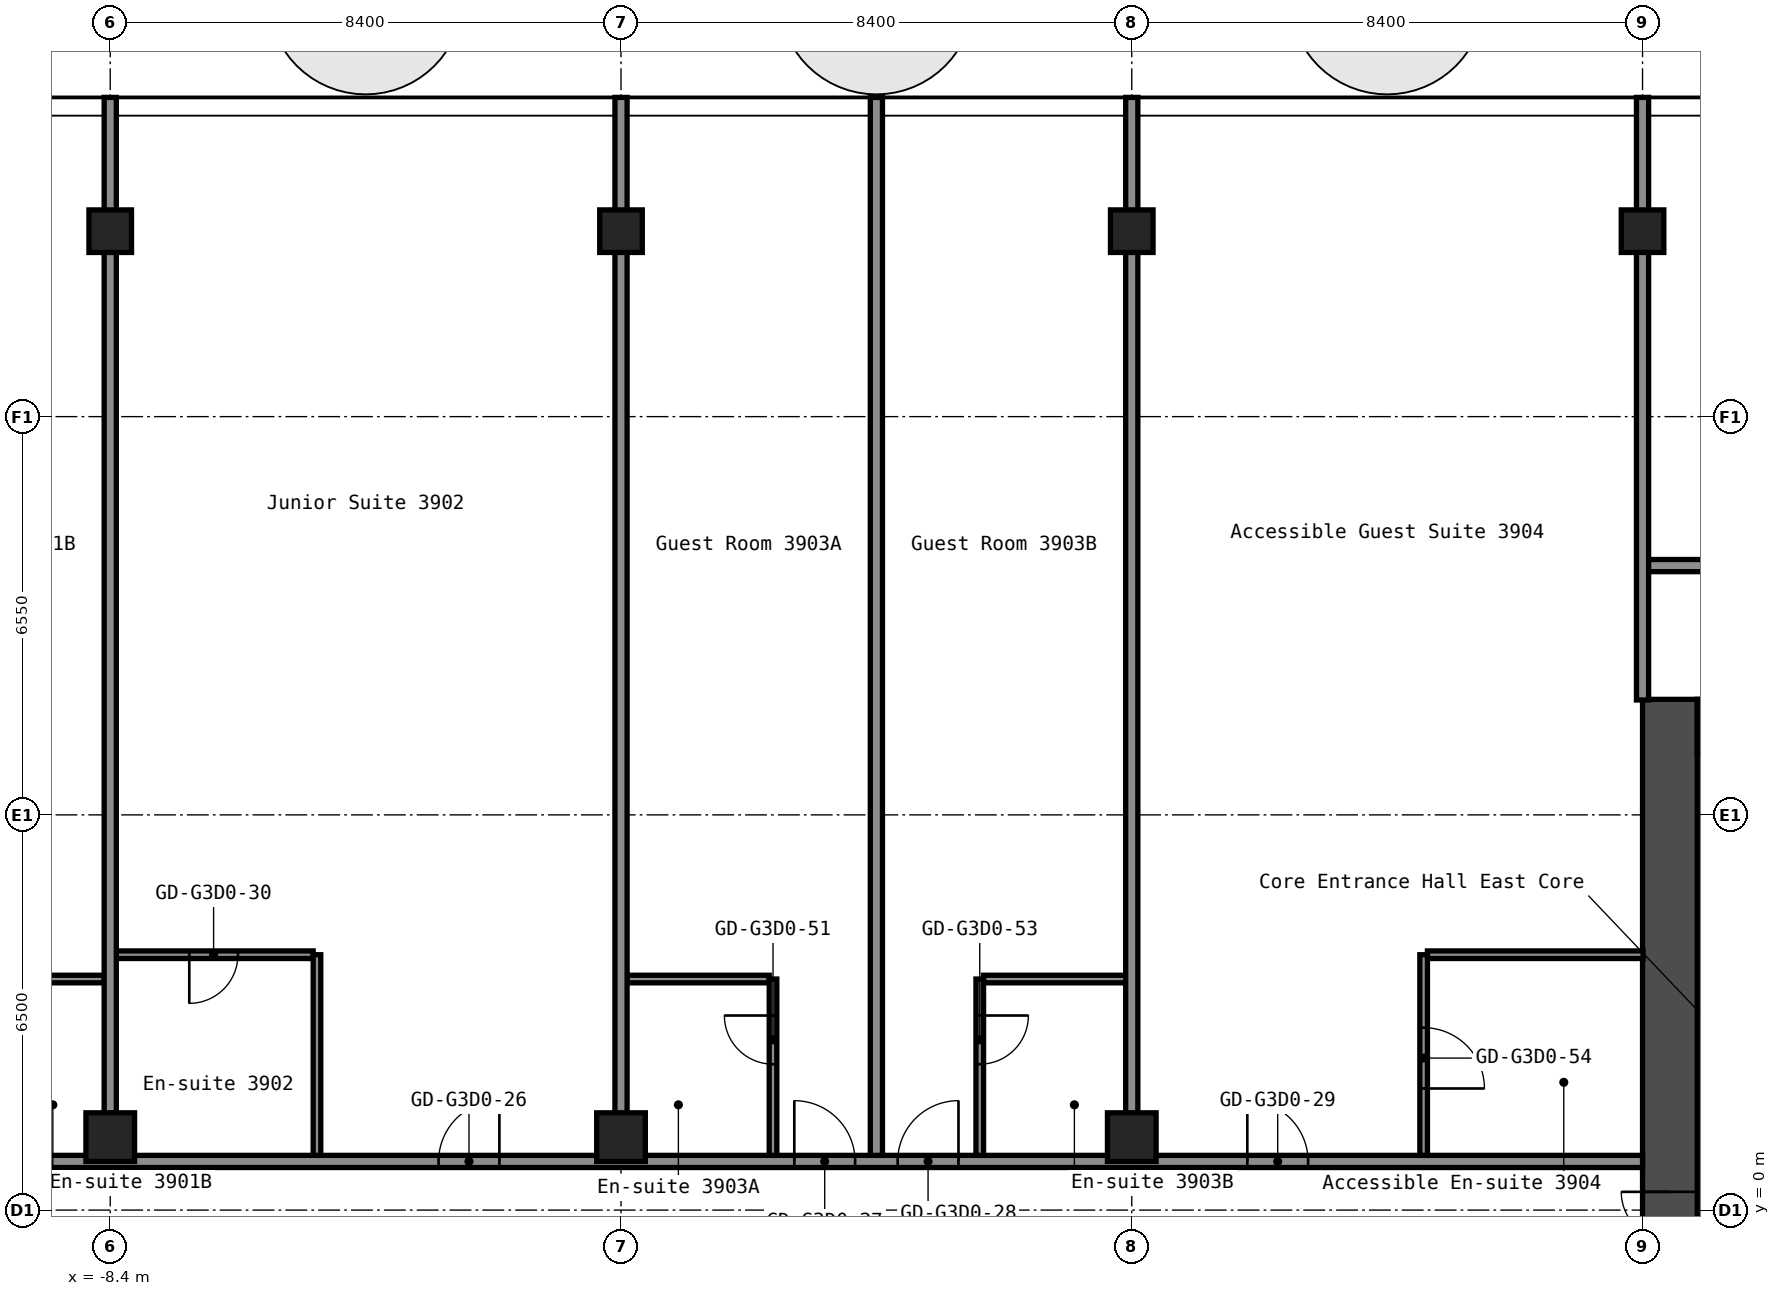
"""IFC4 building model, lengths in metres.
Left out: names, types, materials, properties, quantities, classifications, styles, units other than length and angle.
Written with IfcOpenShell. Run it as: python <this file> out.ifc"""

import sys

from ifc_helpers import new_model, si_unit, direction, frame, frame_2d, origin, origin_2d, place, context, subcontext, project, spatial, rectangle, hollow_rectangle, extrude, element, fill, save


model = new_model("IFC4")
c1 = context("Model", 3, precision=1e-05, world=origin(), true_north=direction((0.0, 1.0)))
c2 = subcontext(c1, "Body", "Model", "MODEL_VIEW")
j1 = project(units=[si_unit("LENGTHUNIT", "METRE"), si_unit("PLANEANGLEUNIT", "RADIAN")], contexts=[c1])
p1 = place(None, origin())
s1 = spatial("IfcSite", under=j1, at=p1, CompositionType="ELEMENT")
p2 = place(p1, origin())
s2 = spatial("IfcBuilding", under=s1, at=p2, CompositionType="ELEMENT")
p3 = place(p2, frame((0.0, 0.0, 140.6)))
s3 = spatial("IfcBuildingStorey", under=s2, at=p3, CompositionType="ELEMENT", Elevation=140.6)
p4 = place(p3, frame((-8.4, 1.2, 0.0), z_axis=(0.0, 0.0, 1.0), x_axis=(1.0, 0.0, 0.0)))
e1 = element("IfcColumn", 1, at=p4, inside=s3, PredefinedType="COLUMN", context=c2, shape_type="SweptSolid", body=[
    extrude(hollow_rectangle(XDim=0.8, YDim=0.8, WallThickness=0.032, at=origin_2d()), origin(), (0.0, 0.0, 1.0), 2.75),
])
p5 = place(p3, frame((-8.4, 16.1, 0.0), z_axis=(0.0, 0.0, 1.0), x_axis=(1.0, 0.0, 0.0)))
e2 = element("IfcColumn", 2, at=p5, inside=s3, PredefinedType="COLUMN", context=c2, shape_type="SweptSolid", body=[
    extrude(hollow_rectangle(XDim=0.7, YDim=0.7, WallThickness=0.028, at=origin_2d()), origin(), (0.0, 0.0, 1.0), 2.75),
])
p6 = place(p3, frame((0.0, 1.2, 0.0), z_axis=(0.0, 0.0, 1.0), x_axis=(1.0, 0.0, 0.0)))
e3 = element("IfcColumn", 3, at=p6, inside=s3, PredefinedType="COLUMN", context=c2, shape_type="SweptSolid", body=[
    extrude(hollow_rectangle(XDim=0.8, YDim=0.8, WallThickness=0.032, at=origin_2d()), origin(), (0.0, 0.0, 1.0), 2.75),
])
p7 = place(p3, frame((0.0, 16.1, 0.0), z_axis=(0.0, 0.0, 1.0), x_axis=(1.0, 0.0, 0.0)))
e4 = element("IfcColumn", 4, at=p7, inside=s3, PredefinedType="COLUMN", context=c2, shape_type="SweptSolid", body=[
    extrude(hollow_rectangle(XDim=0.7, YDim=0.7, WallThickness=0.028, at=origin_2d()), origin(), (0.0, 0.0, 1.0), 2.75),
])
p8 = place(p3, frame((8.4, 1.2, 0.0), z_axis=(0.0, 0.0, 1.0), x_axis=(1.0, 0.0, 0.0)))
e5 = element("IfcColumn", 5, at=p8, inside=s3, PredefinedType="COLUMN", context=c2, shape_type="SweptSolid", body=[
    extrude(hollow_rectangle(XDim=0.8, YDim=0.8, WallThickness=0.032, at=origin_2d()), origin(), (0.0, 0.0, 1.0), 2.75),
])
for number, where, z_axis, x_axis in (
    (6, (8.4, 16.1, 0.0), (0.0, 0.0, 1.0), (1.0, 0.0, 0.0)),
    (7, (16.8, 16.1, 0.0), (0.0, 0.0, 1.0), (1.0, 0.0, 0.0)),
):
    element("IfcColumn", number, at=place(p3, frame(where, z_axis=z_axis, x_axis=x_axis)), inside=s3, PredefinedType="COLUMN", context=c2, shape_type="SweptSolid", body=[
        extrude(hollow_rectangle(XDim=0.7, YDim=0.7, WallThickness=0.028, at=origin_2d()), origin(), (0.0, 0.0, 1.0), 2.75),
    ])
p9 = place(p3, frame((17.25, -8.4, 0.0), z_axis=(0.0, 0.0, 1.0), x_axis=(0.0, 1.0, 0.0)))
e8 = element("IfcWall", 8, at=p9, inside=s3, PredefinedType="SHEAR", context=c2, shape_type="SweptSolid", body=[
    extrude(rectangle(XDim=16.8, YDim=0.9, at=frame_2d((8.4, 0.0))), origin(), (0.0, 0.0, 1.0), 2.75),
])
p10 = place(p9, frame((7.1, 0.0, 0.0)))
e9 = element("IfcOpeningElement", 9, at=p10, cuts=e8, PredefinedType="OPENING", context=c2, shape_type="SweptSolid", body=[
    extrude(rectangle(XDim=1.6, YDim=2.1, at=frame_2d((0.8, 1.05))), frame((0.0, 0.46, 0.0), z_axis=(0.0, -1.0, 0.0), x_axis=(1.0, 0.0, 0.0)), (0.0, 0.0, 1.0), 0.92),
])
p11 = place(p3, frame((17.7, 7.95, 0.0), z_axis=(0.0, 0.0, 1.0), x_axis=(1.0, 0.0, 0.0)))
e10 = element("IfcWall", 10, at=p11, inside=s3, PredefinedType="SHEAR", context=c2, shape_type="SweptSolid", body=[
    extrude(rectangle(XDim=15.0, YDim=0.9, at=frame_2d((7.5, 0.0))), origin(), (0.0, 0.0, 1.0), 2.75),
])
p12 = place(p11, frame((10.4, 0.0, 0.0)))
e11 = element("IfcOpeningElement", 11, at=p12, cuts=e10, PredefinedType="OPENING", context=c2, shape_type="SweptSolid", body=[
    extrude(rectangle(XDim=1.2, YDim=2.1, at=frame_2d((0.6, 1.05))), frame((0.0, 0.46, 0.0), z_axis=(0.0, -1.0, 0.0), x_axis=(1.0, 0.0, 0.0)), (0.0, 0.0, 1.0), 0.92),
])
p13 = place(p11, frame((13.35, 0.0, 0.0)))
e12 = element("IfcOpeningElement", 12, at=p13, cuts=e10, PredefinedType="OPENING", context=c2, shape_type="SweptSolid", body=[
    extrude(rectangle(XDim=0.9, YDim=2.1, at=frame_2d((0.45, 1.05))), frame((0.0, 0.46, 0.0), z_axis=(0.0, -1.0, 0.0), x_axis=(1.0, 0.0, 0.0)), (0.0, 0.0, 1.0), 0.92),
])
p14 = place(p3, frame((-16.8, 0.8, 0.0), z_axis=(0.0, 0.0, 1.0), x_axis=(1.0, 0.0, 0.0)))
e13 = element("IfcWall", 13, at=p14, inside=s3, PredefinedType="PARTITIONING", context=c2, shape_type="SweptSolid", body=[
    extrude(rectangle(XDim=33.6, YDim=0.2, at=frame_2d((16.8, 0.0))), origin(), (0.0, 0.0, 1.0), 2.75),
])
p15 = place(p14, frame((2.85, 0.0, 0.0)))
e14 = element("IfcOpeningElement", 14, at=p15, cuts=e13, PredefinedType="OPENING", context=c2, shape_type="SweptSolid", body=[
    extrude(rectangle(XDim=1.0, YDim=2.1, at=frame_2d((0.5, 1.05))), frame((0.0, 0.11, 0.0), z_axis=(0.0, -1.0, 0.0), x_axis=(1.0, 0.0, 0.0)), (0.0, 0.0, 1.0), 0.22),
])
p16 = place(p14, frame((4.55, 0.0, 0.0)))
e15 = element("IfcOpeningElement", 15, at=p16, cuts=e13, PredefinedType="OPENING", context=c2, shape_type="SweptSolid", body=[
    extrude(rectangle(XDim=1.0, YDim=2.1, at=frame_2d((0.5, 1.05))), frame((0.0, 0.11, 0.0), z_axis=(0.0, -1.0, 0.0), x_axis=(1.0, 0.0, 0.0)), (0.0, 0.0, 1.0), 0.22),
])
p17 = place(p14, frame((13.8, 0.0, 0.0)))
e16 = element("IfcOpeningElement", 16, at=p17, cuts=e13, PredefinedType="OPENING", context=c2, shape_type="SweptSolid", body=[
    extrude(rectangle(XDim=1.0, YDim=2.1, at=frame_2d((0.5, 1.05))), frame((0.0, 0.11, 0.0), z_axis=(0.0, -1.0, 0.0), x_axis=(1.0, 0.0, 0.0)), (0.0, 0.0, 1.0), 0.22),
])
p18 = place(p14, frame((19.65, 0.0, 0.0)))
e17 = element("IfcOpeningElement", 17, at=p18, cuts=e13, PredefinedType="OPENING", context=c2, shape_type="SweptSolid", body=[
    extrude(rectangle(XDim=1.0, YDim=2.1, at=frame_2d((0.5, 1.05))), frame((0.0, 0.11, 0.0), z_axis=(0.0, -1.0, 0.0), x_axis=(1.0, 0.0, 0.0)), (0.0, 0.0, 1.0), 0.22),
])
p19 = place(p14, frame((21.35, 0.0, 0.0)))
e18 = element("IfcOpeningElement", 18, at=p19, cuts=e13, PredefinedType="OPENING", context=c2, shape_type="SweptSolid", body=[
    extrude(rectangle(XDim=1.0, YDim=2.1, at=frame_2d((0.5, 1.05))), frame((0.0, 0.11, 0.0), z_axis=(0.0, -1.0, 0.0), x_axis=(1.0, 0.0, 0.0)), (0.0, 0.0, 1.0), 0.22),
])
p20 = place(p14, frame((27.1, 0.0, 0.0)))
e19 = element("IfcOpeningElement", 19, at=p20, cuts=e13, PredefinedType="OPENING", context=c2, shape_type="SweptSolid", body=[
    extrude(rectangle(XDim=1.0, YDim=2.1, at=frame_2d((0.5, 1.05))), frame((0.0, 0.11, 0.0), z_axis=(0.0, -1.0, 0.0), x_axis=(1.0, 0.0, 0.0)), (0.0, 0.0, 1.0), 0.22),
])
for number, where, z_axis, x_axis in (
    (20, (-10.837, 3.8, 0.0), (0.0, 0.0, 1.0), (1.0, 0.0, 0.0)),
    (21, (0.1, 3.8, 0.0), (0.0, 0.0, 1.0), (1.0, 0.0, 0.0)),
):
    element("IfcWall", number, at=place(p3, frame(where, z_axis=z_axis, x_axis=x_axis)), inside=s3, PredefinedType="PARTITIONING", context=c2, shape_type="SweptSolid", body=[
        extrude(rectangle(XDim=2.337, YDim=0.125, at=frame_2d((1.169, 0.0))), origin(), (0.0, 0.0, 1.0), 2.75),
    ])
p21 = place(p3, frame((5.962, 3.8, 0.0), z_axis=(0.0, 0.0, 1.0), x_axis=(1.0, 0.0, 0.0)))
e22 = element("IfcWall", 22, at=p21, inside=s3, PredefinedType="PARTITIONING", context=c2, shape_type="SweptSolid", body=[
    extrude(rectangle(XDim=2.338, YDim=0.125, at=frame_2d((1.169, 0.0))), origin(), (0.0, 0.0, 1.0), 2.75),
])
p22 = place(p3, frame((-8.3, 4.2, 0.0), z_axis=(0.0, 0.0, 1.0), x_axis=(1.0, 0.0, 0.0)))
e23 = element("IfcWall", 23, at=p22, inside=s3, PredefinedType="PARTITIONING", context=c2, shape_type="SweptSolid", body=[
    extrude(rectangle(XDim=3.238, YDim=0.125, at=frame_2d((1.619, 0.0))), origin(), (0.0, 0.0, 1.0), 2.75),
])
p23 = place(p22, frame((1.2, 0.0, 0.0)))
e24 = element("IfcOpeningElement", 24, at=p23, cuts=e23, PredefinedType="OPENING", context=c2, shape_type="SweptSolid", body=[
    extrude(rectangle(XDim=0.8, YDim=2.1, at=frame_2d((0.4, 1.05))), frame((0.0, 0.073, 0.0), z_axis=(0.0, -1.0, 0.0), x_axis=(1.0, 0.0, 0.0)), (0.0, 0.0, 1.0), 0.145),
])
p24 = place(p3, frame((13.262, 4.2, 0.0), z_axis=(0.0, 0.0, 1.0), x_axis=(1.0, 0.0, 0.0)))
e25 = element("IfcWall", 25, at=p24, inside=s3, PredefinedType="PARTITIONING", context=c2, shape_type="SweptSolid", body=[
    extrude(rectangle(XDim=3.548, YDim=0.125, at=frame_2d((1.774, 0.0))), origin(), (0.0, 0.0, 1.0), 2.75),
])
p25 = place(p3, frame((16.8, 10.6, 0.0), z_axis=(0.0, 0.0, 1.0), x_axis=(1.0, 0.0, 0.0)))
e26 = element("IfcWall", 26, at=p25, inside=s3, PredefinedType="PARTITIONING", context=c2, shape_type="SweptSolid", body=[
    extrude(rectangle(XDim=25.9, YDim=0.2, at=frame_2d((12.95, 0.0))), origin(), (0.0, 0.0, 1.0), 2.75),
])
p26 = place(p25, frame((3.4, 0.0, 0.0)))
e27 = element("IfcOpeningElement", 27, at=p26, cuts=e26, PredefinedType="OPENING", context=c2, shape_type="SweptSolid", body=[
    extrude(rectangle(XDim=1.6, YDim=2.1, at=frame_2d((0.8, 1.05))), frame((0.0, 0.11, 0.0), z_axis=(0.0, -1.0, 0.0), x_axis=(1.0, 0.0, 0.0)), (0.0, 0.0, 1.0), 0.22),
])
p27 = place(p25, frame((11.8, 0.0, 0.0)))
e28 = element("IfcOpeningElement", 28, at=p27, cuts=e26, PredefinedType="OPENING", context=c2, shape_type="SweptSolid", body=[
    extrude(rectangle(XDim=1.6, YDim=2.1, at=frame_2d((0.8, 1.05))), frame((0.0, 0.11, 0.0), z_axis=(0.0, -1.0, 0.0), x_axis=(1.0, 0.0, 0.0)), (0.0, 0.0, 1.0), 0.22),
])
p28 = place(p25, frame((20.4, 0.0, 0.0)))
e29 = element("IfcOpeningElement", 29, at=p28, cuts=e26, PredefinedType="OPENING", context=c2, shape_type="SweptSolid", body=[
    extrude(rectangle(XDim=1.6, YDim=2.1, at=frame_2d((0.8, 1.05))), frame((0.0, 0.11, 0.0), z_axis=(0.0, -1.0, 0.0), x_axis=(1.0, 0.0, 0.0)), (0.0, 0.0, 1.0), 0.22),
])
p29 = place(p3, frame((-8.4, 1.59, 0.0), z_axis=(0.0, 0.0, 1.0), x_axis=(0.0, 1.0, 0.0)))
e30 = element("IfcWall", 30, at=p29, inside=s3, PredefinedType="PARTITIONING", context=c2, shape_type="SweptSolid", body=[
    extrude(rectangle(XDim=16.71, YDim=0.2, at=frame_2d((8.355, 0.0))), origin(), (0.0, 0.0, 1.0), 2.75),
])
p30 = place(p3, frame((-5.0, 0.9, 0.0), z_axis=(0.0, 0.0, 1.0), x_axis=(0.0, 1.0, 0.0)))
e31 = element("IfcWall", 31, at=p30, inside=s3, PredefinedType="PARTITIONING", context=c2, shape_type="SweptSolid", body=[
    extrude(rectangle(XDim=3.3, YDim=0.125, at=frame_2d((1.65, 0.0))), origin(), (0.0, 0.0, 1.0), 2.75),
])
p31 = place(p3, frame((0.0, 1.59, 0.0), z_axis=(0.0, 0.0, 1.0), x_axis=(0.0, 1.0, 0.0)))
e32 = element("IfcWall", 32, at=p31, inside=s3, PredefinedType="PARTITIONING", context=c2, shape_type="SweptSolid", body=[
    extrude(rectangle(XDim=16.71, YDim=0.2, at=frame_2d((8.355, 0.0))), origin(), (0.0, 0.0, 1.0), 2.75),
])
p32 = place(p3, frame((2.5, 0.9, 0.0), z_axis=(0.0, 0.0, 1.0), x_axis=(0.0, 1.0, 0.0)))
e33 = element("IfcWall", 33, at=p32, inside=s3, PredefinedType="PARTITIONING", context=c2, shape_type="SweptSolid", body=[
    extrude(rectangle(XDim=2.9, YDim=0.125, at=frame_2d((1.45, 0.0))), origin(), (0.0, 0.0, 1.0), 2.75),
])
p33 = place(p32, frame((1.5, 0.0, 0.0)))
e34 = element("IfcOpeningElement", 34, at=p33, cuts=e33, PredefinedType="OPENING", context=c2, shape_type="SweptSolid", body=[
    extrude(rectangle(XDim=0.8, YDim=2.1, at=frame_2d((0.4, 1.05))), frame((0.0, 0.073, 0.0), z_axis=(0.0, -1.0, 0.0), x_axis=(1.0, 0.0, 0.0)), (0.0, 0.0, 1.0), 0.145),
])
p34 = place(p3, frame((4.2, 0.9, 0.0), z_axis=(0.0, 0.0, 1.0), x_axis=(0.0, 1.0, 0.0)))
e35 = element("IfcWall", 35, at=p34, inside=s3, PredefinedType="PARTITIONING", context=c2, shape_type="SweptSolid", body=[
    extrude(rectangle(XDim=17.4, YDim=0.2, at=frame_2d((8.7, 0.0))), origin(), (0.0, 0.0, 1.0), 2.75),
])
p35 = place(p3, frame((5.9, 0.9, 0.0), z_axis=(0.0, 0.0, 1.0), x_axis=(0.0, 1.0, 0.0)))
e36 = element("IfcWall", 36, at=p35, inside=s3, PredefinedType="PARTITIONING", context=c2, shape_type="SweptSolid", body=[
    extrude(rectangle(XDim=2.9, YDim=0.125, at=frame_2d((1.45, 0.0))), origin(), (0.0, 0.0, 1.0), 2.75),
])
p36 = place(p35, frame((1.5, 0.0, 0.0)))
e37 = element("IfcOpeningElement", 37, at=p36, cuts=e36, PredefinedType="OPENING", context=c2, shape_type="SweptSolid", body=[
    extrude(rectangle(XDim=0.8, YDim=2.1, at=frame_2d((0.4, 1.05))), frame((0.0, 0.073, 0.0), z_axis=(0.0, -1.0, 0.0), x_axis=(1.0, 0.0, 0.0)), (0.0, 0.0, 1.0), 0.145),
])
p37 = place(p3, frame((8.4, 1.59, 0.0), z_axis=(0.0, 0.0, 1.0), x_axis=(0.0, 1.0, 0.0)))
e38 = element("IfcWall", 38, at=p37, inside=s3, PredefinedType="PARTITIONING", context=c2, shape_type="SweptSolid", body=[
    extrude(rectangle(XDim=16.71, YDim=0.2, at=frame_2d((8.355, 0.0))), origin(), (0.0, 0.0, 1.0), 2.75),
])
p38 = place(p3, frame((13.2, 0.9, 0.0), z_axis=(0.0, 0.0, 1.0), x_axis=(0.0, 1.0, 0.0)))
e39 = element("IfcWall", 39, at=p38, inside=s3, PredefinedType="PARTITIONING", context=c2, shape_type="SweptSolid", body=[
    extrude(rectangle(XDim=3.3, YDim=0.125, at=frame_2d((1.65, 0.0))), origin(), (0.0, 0.0, 1.0), 2.75),
])
p39 = place(p38, frame((1.1, 0.0, 0.0)))
e40 = element("IfcOpeningElement", 40, at=p39, cuts=e39, PredefinedType="OPENING", context=c2, shape_type="SweptSolid", body=[
    extrude(rectangle(XDim=1.0, YDim=2.1, at=frame_2d((0.5, 1.05))), frame((0.0, 0.073, 0.0), z_axis=(0.0, -1.0, 0.0), x_axis=(1.0, 0.0, 0.0)), (0.0, 0.0, 1.0), 0.145),
])
p40 = place(p3, frame((16.8, 8.39, 0.0), z_axis=(0.0, 0.0, 1.0), x_axis=(0.0, 1.0, 0.0)))
e41 = element("IfcWall", 41, at=p40, inside=s3, PredefinedType="PARTITIONING", context=c2, shape_type="SweptSolid", body=[
    extrude(rectangle(XDim=9.91, YDim=0.2, at=frame_2d((4.955, 0.0))), origin(), (0.0, 0.0, 1.0), 2.75),
])
p41 = place(p10, origin())
e42 = element("IfcDoor", 42, at=p41, inside=s3, OperationType="DOUBLE_DOOR_SINGLE_SWING", PredefinedType="DOOR", context=c2, shape_type="SweptSolid", body=[
    extrude(rectangle(XDim=1.6, YDim=2.1, at=frame_2d((0.8, 1.05))), frame((0.0, 0.025, 0.0), z_axis=(0.0, -1.0, 0.0), x_axis=(1.0, 0.0, 0.0)), (0.0, 0.0, 1.0), 0.05),
])
fill(e9, e42)
p42 = place(p17, origin())
e43 = element("IfcDoor", 43, at=p42, inside=s3, OperationType="SINGLE_SWING_LEFT", PredefinedType="DOOR", context=c2, shape_type="SweptSolid", body=[
    extrude(rectangle(XDim=1.0, YDim=2.1, at=frame_2d((0.5, 1.05))), frame((0.0, 0.025, 0.0), z_axis=(0.0, -1.0, 0.0), x_axis=(1.0, 0.0, 0.0)), (0.0, 0.0, 1.0), 0.05),
])
fill(e16, e43)
p43 = place(p18, origin())
e44 = element("IfcDoor", 44, at=p43, inside=s3, OperationType="SINGLE_SWING_RIGHT", PredefinedType="DOOR", context=c2, shape_type="SweptSolid", body=[
    extrude(rectangle(XDim=1.0, YDim=2.1, at=frame_2d((0.5, 1.05))), frame((0.0, 0.025, 0.0), z_axis=(0.0, -1.0, 0.0), x_axis=(1.0, 0.0, 0.0)), (0.0, 0.0, 1.0), 0.05),
])
fill(e17, e44)
p44 = place(p19, origin())
e45 = element("IfcDoor", 45, at=p44, inside=s3, OperationType="SINGLE_SWING_LEFT", PredefinedType="DOOR", context=c2, shape_type="SweptSolid", body=[
    extrude(rectangle(XDim=1.0, YDim=2.1, at=frame_2d((0.5, 1.05))), frame((0.0, 0.025, 0.0), z_axis=(0.0, -1.0, 0.0), x_axis=(1.0, 0.0, 0.0)), (0.0, 0.0, 1.0), 0.05),
])
fill(e18, e45)
p45 = place(p20, origin())
e46 = element("IfcDoor", 46, at=p45, inside=s3, OperationType="SINGLE_SWING_RIGHT", PredefinedType="DOOR", context=c2, shape_type="SweptSolid", body=[
    extrude(rectangle(XDim=1.0, YDim=2.1, at=frame_2d((0.5, 1.05))), frame((0.0, 0.025, 0.0), z_axis=(0.0, -1.0, 0.0), x_axis=(1.0, 0.0, 0.0)), (0.0, 0.0, 1.0), 0.05),
])
fill(e19, e46)
p46 = place(p23, origin())
e47 = element("IfcDoor", 47, at=p46, inside=s3, OperationType="SINGLE_SWING_LEFT", PredefinedType="DOOR", context=c2, shape_type="SweptSolid", body=[
    extrude(rectangle(XDim=0.8, YDim=2.1, at=frame_2d((0.4, 1.05))), frame((0.0, 0.025, 0.0), z_axis=(0.0, -1.0, 0.0), x_axis=(1.0, 0.0, 0.0)), (0.0, 0.0, 1.0), 0.05),
])
fill(e24, e47)
p47 = place(p33, origin())
e48 = element("IfcDoor", 48, at=p47, inside=s3, OperationType="SINGLE_SWING_LEFT", PredefinedType="DOOR", context=c2, shape_type="SweptSolid", body=[
    extrude(rectangle(XDim=0.8, YDim=2.1, at=frame_2d((0.4, 1.05))), frame((0.0, 0.025, 0.0), z_axis=(0.0, -1.0, 0.0), x_axis=(1.0, 0.0, 0.0)), (0.0, 0.0, 1.0), 0.05),
])
fill(e34, e48)
p48 = place(p36, origin())
e49 = element("IfcDoor", 49, at=p48, inside=s3, OperationType="SINGLE_SWING_RIGHT", PredefinedType="DOOR", context=c2, shape_type="SweptSolid", body=[
    extrude(rectangle(XDim=0.8, YDim=2.1, at=frame_2d((0.4, 1.05))), frame((0.0, 0.025, 0.0), z_axis=(0.0, -1.0, 0.0), x_axis=(1.0, 0.0, 0.0)), (0.0, 0.0, 1.0), 0.05),
])
fill(e37, e49)
p49 = place(p39, origin())
e50 = element("IfcDoor", 50, at=p49, inside=s3, OperationType="SINGLE_SWING_LEFT", PredefinedType="DOOR", context=c2, shape_type="SweptSolid", body=[
    extrude(rectangle(XDim=1.0, YDim=2.1, at=frame_2d((0.5, 1.05))), frame((0.0, 0.025, 0.0), z_axis=(0.0, -1.0, 0.0), x_axis=(1.0, 0.0, 0.0)), (0.0, 0.0, 1.0), 0.05),
])
fill(e40, e50)
save(model, sys.argv[1])
